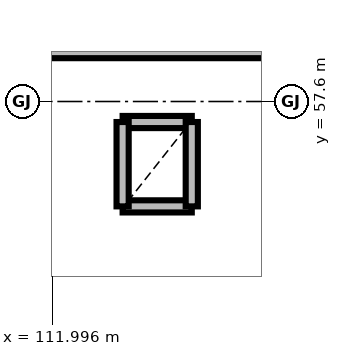
"""IFC4 building model, lengths in metres.
Left out: names, types, materials, properties, quantities, classifications, styles, units other than length and angle.
Written with IfcOpenShell. Run it as: python <this file> out.ifc"""

import sys

from ifc_helpers import new_model, si_unit, direction, frame, frame_2d, origin, place, context, subcontext, project, spatial, rectangle, extrude, element, save


model = new_model("IFC4")
c1 = context("Model", 3, precision=1e-05, world=origin(), true_north=direction((0.0, 1.0)))
c2 = subcontext(c1, "Body", "Model", "MODEL_VIEW")
j1 = project(units=[si_unit("LENGTHUNIT", "METRE"), si_unit("PLANEANGLEUNIT", "RADIAN")], contexts=[c1])
p1 = place(None, origin())
s1 = spatial("IfcSite", under=j1, at=p1, CompositionType="ELEMENT")
p2 = place(p1, origin())
s2 = spatial("IfcBuilding", under=s1, at=p2, CompositionType="ELEMENT")
p3 = place(p2, frame((0.0, 0.0, 5.1)))
s3 = spatial("IfcBuildingStorey", under=s2, at=p3, CompositionType="ELEMENT", Elevation=5.1)
p4 = place(p3, frame((112.92, 56.22, 0.0), z_axis=(0.0, 0.0, 1.0), x_axis=(1.0, 0.0, 0.0)))
e1 = element("IfcWall", 1, at=p4, inside=s3, PredefinedType="PARTITIONING", context=c2, shape_type="SweptSolid", body=[
    extrude(rectangle(XDim=0.91, YDim=0.16, at=frame_2d((0.455, 0.0))), origin(), (0.0, 0.0, 1.0), 3.65),
])
p5 = place(p3, frame((113.83, 57.33, 0.0), z_axis=(0.0, 0.0, 1.0), x_axis=(-1.0, 0.0, 0.0)))
e2 = element("IfcWall", 2, at=p5, inside=s3, PredefinedType="PARTITIONING", context=c2, shape_type="SweptSolid", body=[
    extrude(rectangle(XDim=0.91, YDim=0.16, at=frame_2d((0.455, 0.0))), origin(), (0.0, 0.0, 1.0), 3.155),
])
for number, where, z_axis, x_axis in (
    (3, (112.92, 57.33, 0.0), (0.0, 0.0, 1.0), (0.0, -1.0, 0.0)),
    (4, (113.83, 56.22, 0.0), (0.0, 0.0, 1.0), (0.0, 1.0, 0.0)),
):
    element("IfcWall", number, at=place(p3, frame(where, z_axis=z_axis, x_axis=x_axis)), inside=s3, PredefinedType="PARTITIONING", context=c2, shape_type="SweptSolid", body=[
        extrude(rectangle(XDim=1.11, YDim=0.16, at=frame_2d((0.555, 0.0))), origin(), (0.0, 0.0, 1.0), 3.155),
    ])
p6 = place(p3, frame((134.18, 58.25, 0.0), z_axis=(0.0, 0.0, 1.0), x_axis=(-1.0, 0.0, 0.0)))
e5 = element("IfcWall", 5, at=p6, inside=s3, PredefinedType="PARTITIONING", context=c2, shape_type="SweptSolid", body=[
    extrude(rectangle(XDim=31.09, YDim=0.16, at=frame_2d((15.545, 0.0))), origin(), (0.0, 0.0, 1.0), 3.305),
])
p7 = place(p6, frame((28.99, 0.0, 0.0)))
e6 = element("IfcOpeningElement", 6, at=p7, cuts=e5, PredefinedType="OPENING", context=c2, shape_type="SweptSolid", body=[
    extrude(rectangle(XDim=1.65, YDim=2.2, at=frame_2d((0.825, 1.1))), frame((0.0, 0.09, 0.0), z_axis=(0.0, -1.0, 0.0), x_axis=(1.0, 0.0, 0.0)), (0.0, 0.0, 1.0), 0.18),
])
save(model, sys.argv[1])
